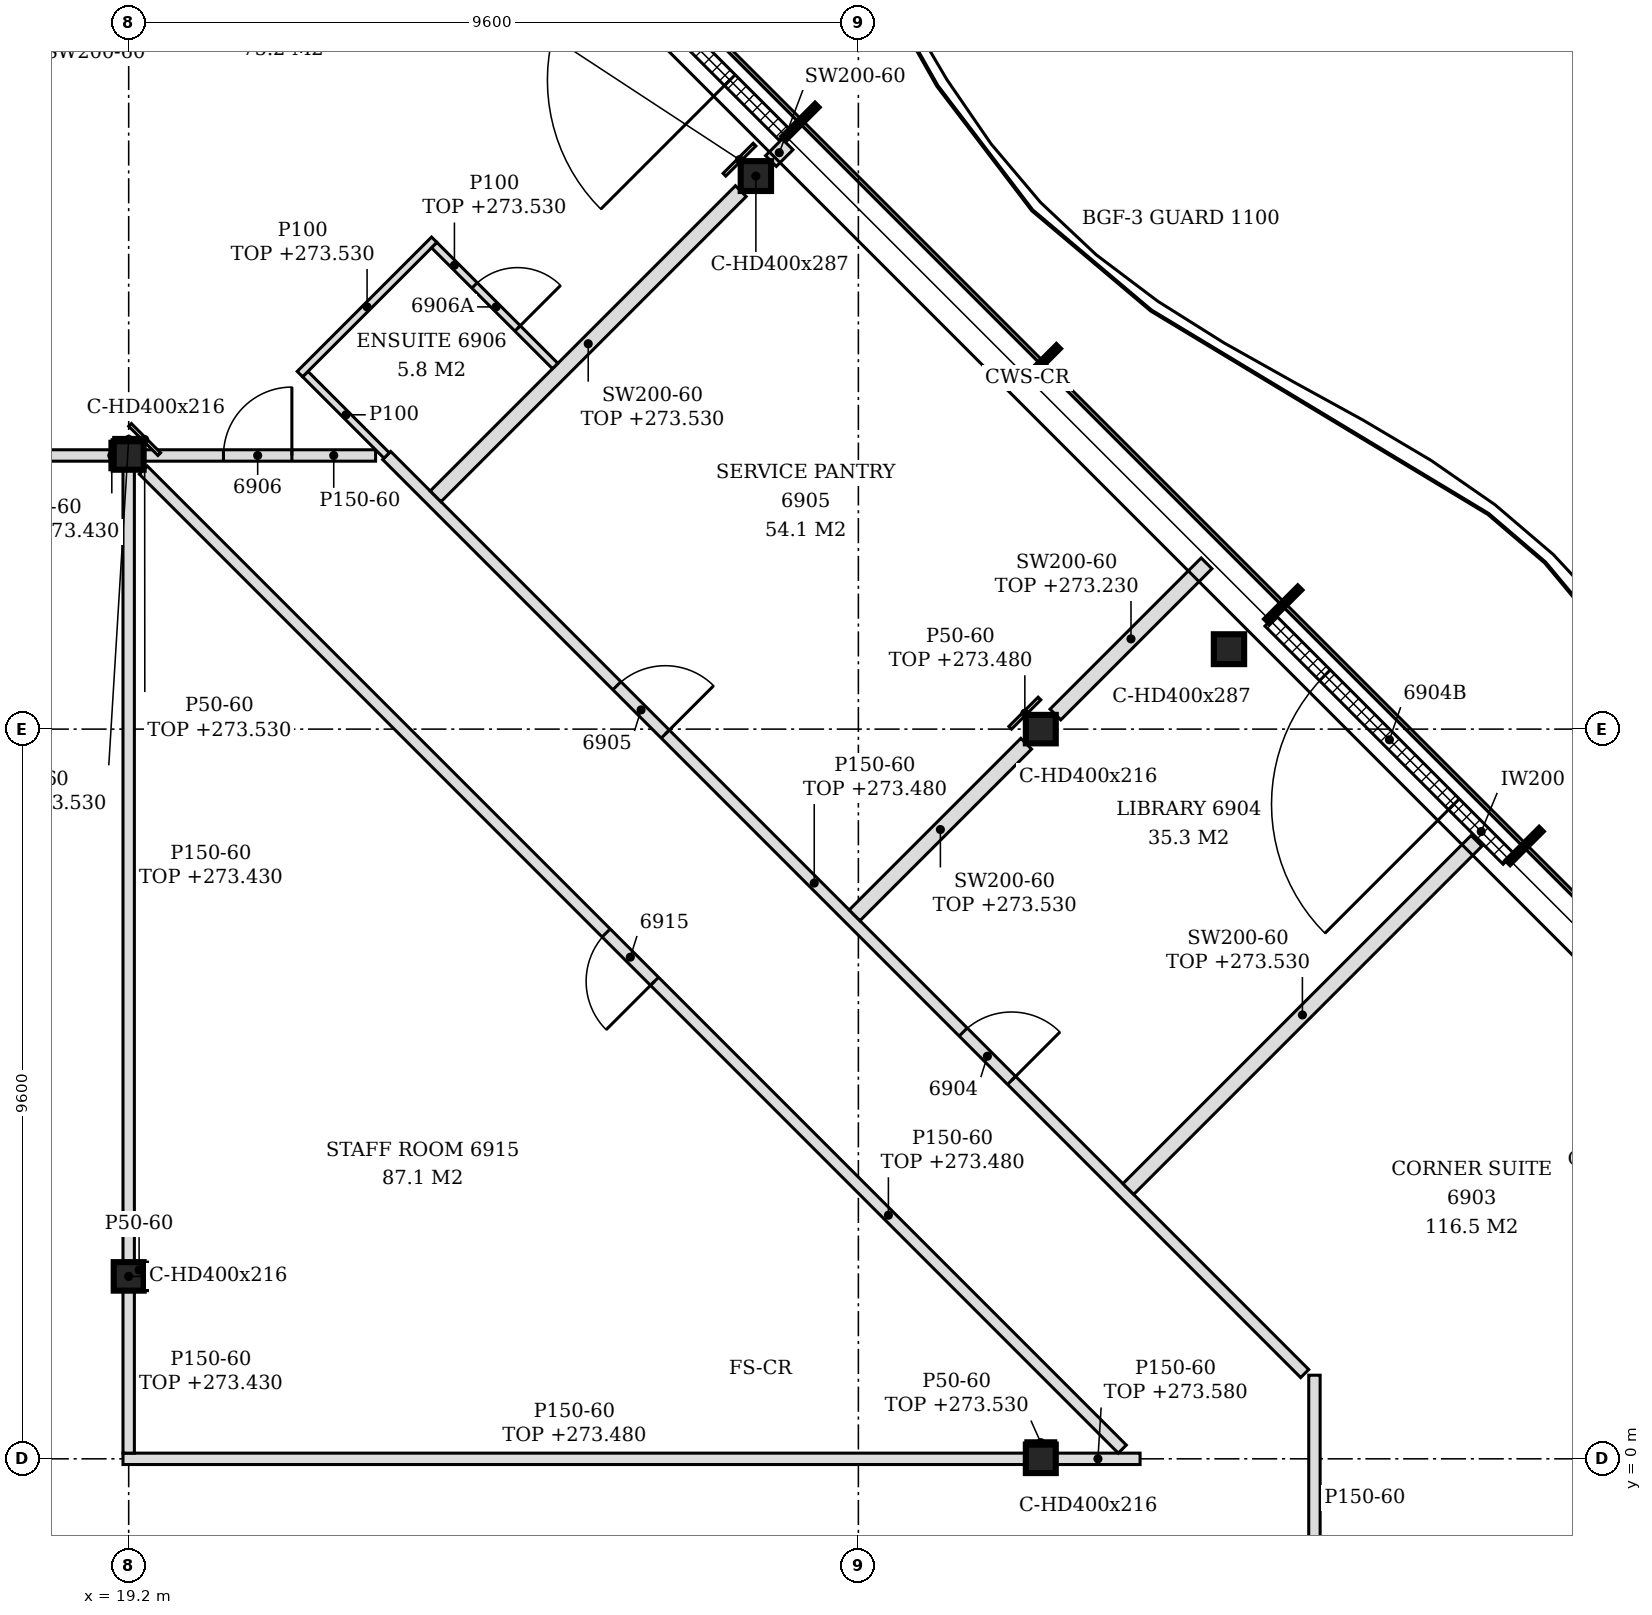
"""IFC4 building model, lengths in metres.
Left out: names, types, materials, properties, quantities, classifications, styles, units other than length and angle.
Written with IfcOpenShell. Run it as: python <this file> out.ifc"""

import sys

from ifc_helpers import new_model, si_unit, direction, frame, frame_2d, origin, origin_2d, place, context, subcontext, project, spatial, polyline, rectangle, i_section, outline, extrude, element, fill, save


model = new_model("IFC4")
c1 = context("Model", 3, precision=1e-05, world=origin(), true_north=direction((0.0, 1.0)))
c2 = subcontext(c1, "Body", "Model", "MODEL_VIEW")
j1 = project(units=[si_unit("LENGTHUNIT", "METRE"), si_unit("PLANEANGLEUNIT", "RADIAN")], contexts=[c1])
p1 = place(None, origin())
s1 = spatial("IfcSite", under=j1, at=p1, CompositionType="ELEMENT")
p2 = place(p1, origin())
s2 = spatial("IfcBuilding", under=s1, at=p2, CompositionType="ELEMENT")
p3 = place(p2, frame((0.0, 0.0, 270.6)))
s3 = spatial("IfcBuildingStorey", under=s2, at=p3, CompositionType="ELEMENT", Elevation=270.6)
for number, where, z_axis, x_axis in (
    (1, (33.676, 10.652, -0.15), (0.0, 0.0, 1.0), (1.0, 0.0, 0.0)),
    (2, (27.451, 16.876, -0.15), (0.0, 0.0, 1.0), (1.0, 0.0, 0.0)),
):
    element("IfcColumn", number, at=place(p3, frame(where, z_axis=z_axis, x_axis=x_axis)), inside=s3, PredefinedType="COLUMN", context=c2, shape_type="SweptSolid", body=[
        extrude(i_section(OverallWidth=0.399, OverallDepth=0.393, WebThickness=0.023, FlangeThickness=0.037, FilletRadius=0.015, at=origin_2d()), origin(), (0.0, 0.0, 1.0), 3.6),
    ])
for number, where, z_axis, x_axis in (
    (3, (19.2, 2.4, -0.15), (0.0, 0.0, 1.0), (1.0, 0.0, 0.0)),
    (4, (19.2, 13.2, -0.15), (0.0, 0.0, 1.0), (1.0, 0.0, 0.0)),
    (5, (31.2, 0.0, -0.15), (0.0, 0.0, 1.0), (1.0, 0.0, 0.0)),
    (6, (31.2, 9.6, -0.15), (0.0, 0.0, 1.0), (1.0, 0.0, 0.0)),
):
    element("IfcColumn", number, at=place(p3, frame(where, z_axis=z_axis, x_axis=x_axis)), inside=s3, PredefinedType="COLUMN", context=c2, shape_type="SweptSolid", body=[
        extrude(i_section(OverallWidth=0.394, OverallDepth=0.375, WebThickness=0.017, FlangeThickness=0.028, FilletRadius=0.015, at=origin_2d()), origin(), (0.0, 0.0, 1.0), 3.6),
    ])
p4 = place(p3, frame((37.353, 7.893, 0.0), z_axis=(0.0, 0.0, 1.0), x_axis=(-0.707134329907, 0.707079231393, 0.0)))
e7 = element("IfcWall", 7, at=p4, inside=s3, PredefinedType="NOTDEFINED", context=c2, shape_type="SweptSolid", body=[
    extrude(rectangle(XDim=4.431, YDim=0.2, at=frame_2d((2.215, 0.0))), origin(), (0.0, 0.0, 1.0), 3.45),
])
p5 = place(p4, frame((1.016, 0.0, 0.0)))
e8 = element("IfcOpeningElement", 8, at=p5, cuts=e7, PredefinedType="OPENING", context=c2, shape_type="SweptSolid", body=[
    extrude(rectangle(XDim=2.4, YDim=2.4, at=frame_2d((1.2, 1.2))), frame((0.0, 0.11, 0.0), z_axis=(0.0, -1.0, 0.0), x_axis=(1.0, 0.0, 0.0)), (0.0, 0.0, 1.0), 0.22),
])
p6 = place(p3, frame((27.826, 17.42, 0.0), z_axis=(0.0, 0.0, 1.0), x_axis=(-0.707079231393, 0.707134329907, 0.0)))
e9 = element("IfcWall", 9, at=p6, inside=s3, PredefinedType="NOTDEFINED", context=c2, shape_type="SweptSolid", body=[
    extrude(rectangle(XDim=4.431, YDim=0.2, at=frame_2d((2.215, 0.0))), origin(), (0.0, 0.0, 1.0), 3.45),
])
p7 = place(p6, frame((1.015, 0.0, 0.0)))
e10 = element("IfcOpeningElement", 10, at=p7, cuts=e9, PredefinedType="OPENING", context=c2, shape_type="SweptSolid", body=[
    extrude(rectangle(XDim=2.4, YDim=2.4, at=frame_2d((1.2, 1.2))), frame((0.0, 0.11, 0.0), z_axis=(0.0, -1.0, 0.0), x_axis=(1.0, 0.0, 0.0)), (0.0, 0.0, 1.0), 0.22),
])
p8 = place(p3, frame((34.8, -2.134, 0.0), z_axis=(0.0, 0.0, 1.0), x_axis=(0.0, 1.0, 0.0)))
e11 = element("IfcWall", 11, at=p8, inside=s3, PredefinedType="PARTITIONING", context=c2, shape_type="SweptSolid", body=[
    extrude(outline(polyline([(0.0, 0.0), (3.234, 0.0), (3.234, 3.45), (2.229, 3.45), (2.227, 2.98), (2.039, 2.98), (2.037, 3.45), (0.0, 3.45), (0.0, 0.0)])), frame((0.0, 0.075, 0.0), z_axis=(0.0, -1.0, 0.0), x_axis=(1.0, 0.0, 0.0)), (0.0, 0.0, 1.0), 0.15),
])
p9 = place(p3, frame((19.125, 0.0, 0.0), z_axis=(0.0, 0.0, 1.0), x_axis=(1.0, 0.0, 0.0)))
e12 = element("IfcWall", 12, at=p9, inside=s3, PredefinedType="PARTITIONING", context=c2, shape_type="SweptSolid", body=[
    extrude(outline(polyline([(0.0, 0.0), (11.878, 0.0), (11.878, 2.88), (0.225, 2.88), (0.223, 2.83), (0.0, 2.83), (0.0, 0.0)])), frame((0.0, 0.075, 0.0), z_axis=(0.0, -1.0, 0.0), x_axis=(1.0, 0.0, 0.0)), (0.0, 0.0, 1.0), 0.15),
])
p10 = place(p3, frame((31.397, 0.0, 0.0), z_axis=(0.0, 0.0, 1.0), x_axis=(1.0, 0.0, 0.0)))
e13 = element("IfcWall", 13, at=p10, inside=s3, PredefinedType="PARTITIONING", context=c2, shape_type="SweptSolid", body=[
    extrude(rectangle(XDim=1.109, YDim=0.15, at=frame_2d((0.555, 0.0))), origin(), (0.0, 0.0, 1.0), 2.98),
])
p11 = place(p3, frame((19.2, 0.075, 0.0), z_axis=(0.0, 0.0, 1.0), x_axis=(0.0, 1.0, 0.0)))
e14 = element("IfcWall", 14, at=p11, inside=s3, PredefinedType="PARTITIONING", context=c2, shape_type="SweptSolid", body=[
    extrude(rectangle(XDim=2.137, YDim=0.15, at=frame_2d((1.069, 0.0))), origin(), (0.0, 0.0, 1.0), 2.83),
])
p12 = place(p3, frame((32.272, 0.128, 0.0), z_axis=(0.0, 0.0, 1.0), x_axis=(-0.707106781187, 0.707106781187, 0.0)))
e15 = element("IfcWall", 15, at=p12, inside=s3, PredefinedType="PARTITIONING", context=c2, shape_type="SweptSolid", body=[
    extrude(rectangle(XDim=18.215, YDim=0.15, at=frame_2d((9.107, 0.0))), origin(), (0.0, 0.0, 1.0), 2.88),
])
p13 = place(p12, frame((8.703, 0.0, 0.0)))
e16 = element("IfcOpeningElement", 16, at=p13, cuts=e15, PredefinedType="OPENING", context=c2, shape_type="SweptSolid", body=[
    extrude(rectangle(XDim=0.9, YDim=2.1, at=frame_2d((0.45, 1.05))), frame((0.0, 0.085, 0.0), z_axis=(0.0, -1.0, 0.0), x_axis=(1.0, 0.0, 0.0)), (0.0, 0.0, 1.0), 0.17),
])
p14 = place(p3, frame((34.672, 1.122, 0.0), z_axis=(0.0, 0.0, 1.0), x_axis=(-0.707113927758, 0.707099634543, 0.0)))
e17 = element("IfcWall", 17, at=p14, inside=s3, PredefinedType="PARTITIONING", context=c2, shape_type="SweptSolid", body=[
    extrude(rectangle(XDim=17.081, YDim=0.15, at=frame_2d((8.541, 0.0))), origin(), (0.0, 0.0, 1.0), 2.88),
])
p15 = place(p14, frame((5.454, 0.0, 0.0)))
e18 = element("IfcOpeningElement", 18, at=p15, cuts=e17, PredefinedType="OPENING", context=c2, shape_type="SweptSolid", body=[
    extrude(rectangle(XDim=0.9, YDim=2.1, at=frame_2d((0.45, 1.05))), frame((0.0, 0.085, 0.0), z_axis=(0.0, -1.0, 0.0), x_axis=(1.0, 0.0, 0.0)), (0.0, 0.0, 1.0), 0.17),
])
p16 = place(p14, frame((11.897, 0.0, 0.0)))
e19 = element("IfcOpeningElement", 19, at=p16, cuts=e17, PredefinedType="OPENING", context=c2, shape_type="SweptSolid", body=[
    extrude(rectangle(XDim=0.9, YDim=2.1, at=frame_2d((0.45, 1.05))), frame((0.0, 0.085, 0.0), z_axis=(0.0, -1.0, 0.0), x_axis=(1.0, 0.0, 0.0)), (0.0, 0.0, 1.0), 0.17),
])
p17 = place(p3, frame((19.2, 2.587, 0.0), z_axis=(0.0, 0.0, 1.0), x_axis=(0.0, 1.0, 0.0)))
e20 = element("IfcWall", 20, at=p17, inside=s3, PredefinedType="PARTITIONING", context=c2, shape_type="SweptSolid", body=[
    extrude(rectangle(XDim=10.425, YDim=0.15, at=frame_2d((5.212, 0.0))), origin(), (0.0, 0.0, 1.0), 2.83),
])
p18 = place(p3, frame((32.351, 3.549, 0.0), z_axis=(0.0, 0.0, 1.0), x_axis=(0.707106781187, 0.707106781187, 0.0)))
e21 = element("IfcWall", 21, at=p18, inside=s3, PredefinedType="PARTITIONING", context=c2, shape_type="SweptSolid", body=[
    extrude(rectangle(XDim=6.479, YDim=0.2, at=frame_2d((3.24, 0.0))), origin(), (0.0, 0.0, 1.0), 2.93),
])
p19 = place(p3, frame((28.75, 7.15, 0.0), z_axis=(0.0, 0.0, 1.0), x_axis=(0.707106781187, 0.707106781187, 0.0)))
e22 = element("IfcWall", 22, at=p19, inside=s3, PredefinedType="PARTITIONING", context=c2, shape_type="SweptSolid", body=[
    extrude(rectangle(XDim=3.193, YDim=0.2, at=frame_2d((1.597, 0.0))), origin(), (0.0, 0.0, 1.0), 2.93),
])
p20 = place(p3, frame((31.392, 9.792, 0.0), z_axis=(0.0, 0.0, 1.0), x_axis=(0.707106781187, 0.707106781187, 0.0)))
e23 = element("IfcWall", 23, at=p20, inside=s3, PredefinedType="PARTITIONING", context=c2, shape_type="SweptSolid", body=[
    extrude(rectangle(XDim=2.812, YDim=0.2, at=frame_2d((1.406, 0.0))), origin(), (0.0, 0.0, 1.0), 2.63),
])
p21 = place(p3, frame((23.238, 12.662, 0.0), z_axis=(0.0, 0.0, 1.0), x_axis=(0.707128276734, 0.707085284986, 0.0)))
e24 = element("IfcWall", 24, at=p21, inside=s3, PredefinedType="PARTITIONING", context=c2, shape_type="SweptSolid", body=[
    extrude(rectangle(XDim=5.679, YDim=0.2, at=frame_2d((2.839, 0.0))), origin(), (0.0, 0.0, 1.0), 2.93),
])
p22 = place(p3, frame((7.397, 13.2, 0.0), z_axis=(0.0, 0.0, 1.0), x_axis=(1.0, 0.0, 0.0)))
e25 = element("IfcWall", 25, at=p22, inside=s3, PredefinedType="PARTITIONING", context=c2, shape_type="SweptSolid", body=[
    extrude(rectangle(XDim=11.606, YDim=0.15, at=frame_2d((5.803, 0.0))), origin(), (0.0, 0.0, 1.0), 2.83),
])
p23 = place(p22, frame((8.26, 0.0, 0.0)))
e26 = element("IfcOpeningElement", 26, at=p23, cuts=e25, PredefinedType="OPENING", context=c2, shape_type="SweptSolid", body=[
    extrude(rectangle(XDim=0.9, YDim=2.1, at=frame_2d((0.45, 1.05))), frame((0.0, 0.085, 0.0), z_axis=(0.0, -1.0, 0.0), x_axis=(1.0, 0.0, 0.0)), (0.0, 0.0, 1.0), 0.17),
])
p24 = place(p3, frame((19.397, 13.2, 0.0), z_axis=(0.0, 0.0, 1.0), x_axis=(1.0, 0.0, 0.0)))
e27 = element("IfcWall", 27, at=p24, inside=s3, PredefinedType="PARTITIONING", context=c2, shape_type="SweptSolid", body=[
    extrude(rectangle(XDim=3.051, YDim=0.15, at=frame_2d((1.526, 0.0))), origin(), (0.0, 0.0, 1.0), 3.45),
])
p25 = place(p24, frame((1.05, 0.0, 0.0)))
e28 = element("IfcOpeningElement", 28, at=p25, cuts=e27, PredefinedType="OPENING", context=c2, shape_type="SweptSolid", body=[
    extrude(rectangle(XDim=0.9, YDim=2.1, at=frame_2d((0.45, 1.05))), frame((0.0, 0.085, 0.0), z_axis=(0.0, -1.0, 0.0), x_axis=(1.0, 0.0, 0.0)), (0.0, 0.0, 1.0), 0.17),
])
p26 = place(p3, frame((22.594, 13.2, 0.0), z_axis=(0.0, 0.0, 1.0), x_axis=(-0.707106781187, 0.707106781187, 0.0)))
e29 = element("IfcWall", 29, at=p26, inside=s3, PredefinedType="PARTITIONING", context=c2, shape_type="SweptSolid", body=[
    extrude(rectangle(XDim=1.514, YDim=0.1, at=frame_2d((0.757, 0.0))), origin(), (0.0, 0.0, 1.0), 3.45),
])
p27 = place(p3, frame((21.453, 14.271, 0.0), z_axis=(0.0, 0.0, 1.0), x_axis=(0.707057949532, 0.707155609469, 0.0)))
e30 = element("IfcWall", 30, at=p27, inside=s3, PredefinedType="PARTITIONING", context=c2, shape_type="SweptSolid", body=[
    extrude(rectangle(XDim=2.5, YDim=0.1, at=frame_2d((1.25, 0.0))), origin(), (0.0, 0.0, 1.0), 2.93),
])
p28 = place(p3, frame((24.811, 14.377, 0.0), z_axis=(0.0, 0.0, 1.0), x_axis=(-0.707106781187, 0.707106781187, 0.0)))
e31 = element("IfcWall", 31, at=p28, inside=s3, PredefinedType="PARTITIONING", context=c2, shape_type="SweptSolid", body=[
    extrude(rectangle(XDim=2.25, YDim=0.1, at=frame_2d((1.125, 0.0))), origin(), (0.0, 0.0, 1.0), 2.93),
])
p29 = place(p28, frame((0.7, 0.0, 0.0)))
e32 = element("IfcOpeningElement", 32, at=p29, cuts=e31, PredefinedType="OPENING", context=c2, shape_type="SweptSolid", body=[
    extrude(rectangle(XDim=0.8, YDim=2.1, at=frame_2d((0.4, 1.05))), frame((0.0, 0.06, 0.0), z_axis=(0.0, -1.0, 0.0), x_axis=(1.0, 0.0, 0.0)), (0.0, 0.0, 1.0), 0.12),
])
p30 = place(p3, frame((27.65, 17.073, 0.0), z_axis=(0.0, 0.0, 1.0), x_axis=(0.707106781187, 0.707106781187, 0.0)))
e33 = element("IfcWall", 33, at=p30, inside=s3, PredefinedType="PARTITIONING", context=c2, shape_type="SweptSolid", body=[
    extrude(rectangle(XDim=0.31, YDim=0.2, at=frame_2d((0.155, 0.0))), origin(), (0.0, 0.0, 1.0), 3.45),
])
p31 = place(p3, frame((31.003, 0.212, 0.0), z_axis=(0.0, 0.0, 1.0), x_axis=(1.0, 0.0, 0.0)))
e34 = element("IfcWall", 34, at=p31, inside=s3, PredefinedType="PARTITIONING", context=c2, shape_type="SweptSolid", body=[
    extrude(rectangle(XDim=0.394, YDim=0.05, at=frame_2d((0.197, 0.0))), origin(), (0.0, 0.0, 1.0), 2.93),
])
p32 = place(p3, frame((19.422, 2.212, 0.0), z_axis=(0.0, 0.0, 1.0), x_axis=(0.0, 1.0, 0.0)))
e35 = element("IfcWall", 35, at=p32, inside=s3, PredefinedType="PARTITIONING", context=c2, shape_type="SweptSolid", body=[
    extrude(rectangle(XDim=0.375, YDim=0.05, at=frame_2d((0.188, 0.0))), origin(), (0.0, 0.0, 1.0), 3.45),
])
p33 = place(p3, frame((18.978, 13.012, 0.0), z_axis=(0.0, 0.0, 1.0), x_axis=(0.0, 1.0, 0.0)))
e36 = element("IfcWall", 36, at=p33, inside=s3, PredefinedType="PARTITIONING", context=c2, shape_type="SweptSolid", body=[
    extrude(rectangle(XDim=0.375, YDim=0.05, at=frame_2d((0.188, 0.0))), origin(), (0.0, 0.0, 1.0), 2.83),
])
p34 = place(p3, frame((19.602, 13.218, 0.0), z_axis=(0.0, 0.0, 1.0), x_axis=(-0.707106781187, 0.707106781187, 0.0)))
e37 = element("IfcWall", 37, at=p34, inside=s3, PredefinedType="PARTITIONING", context=c2, shape_type="SweptSolid", body=[
    extrude(rectangle(XDim=0.544, YDim=0.05, at=frame_2d((0.272, 0.0))), origin(), (0.0, 0.0, 1.0), 2.93),
])
p35 = place(p3, frame((30.798, 9.618, 0.0), z_axis=(0.0, 0.0, 1.0), x_axis=(0.707106781187, 0.707106781187, 0.0)))
e38 = element("IfcWall", 38, at=p35, inside=s3, PredefinedType="PARTITIONING", context=c2, shape_type="SweptSolid", body=[
    extrude(rectangle(XDim=0.544, YDim=0.05, at=frame_2d((0.272, 0.0))), origin(), (0.0, 0.0, 1.0), 2.88),
])
p36 = place(p3, frame((27.038, 16.893, 0.0), z_axis=(0.0, 0.0, 1.0), x_axis=(0.707106781187, 0.707106781187, 0.0)))
e39 = element("IfcWall", 39, at=p36, inside=s3, PredefinedType="PARTITIONING", context=c2, shape_type="SweptSolid", body=[
    extrude(rectangle(XDim=0.56, YDim=0.05, at=frame_2d((0.28, 0.0))), origin(), (0.0, 0.0, 1.0), 2.93),
])
p37 = place(p3, frame((19.003, 13.413, 0.0), z_axis=(0.0, 0.0, 1.0), x_axis=(1.0, 0.0, 0.0)))
e40 = element("IfcWall", 40, at=p37, inside=s3, PredefinedType="PARTITIONING", context=c2, shape_type="SweptSolid", body=[
    extrude(rectangle(XDim=0.394, YDim=0.05, at=frame_2d((0.197, 0.0))), origin(), (0.0, 0.0, 1.0), 2.93),
])
p38 = place(p5, origin())
e41 = element("IfcDoor", 41, at=p38, inside=s3, OperationType="SINGLE_SWING_LEFT", PredefinedType="DOOR", context=c2, shape_type="SweptSolid", body=[
    extrude(rectangle(XDim=2.4, YDim=2.4, at=frame_2d((1.2, 1.2))), frame((0.0, 0.025, 0.0), z_axis=(0.0, -1.0, 0.0), x_axis=(1.0, 0.0, 0.0)), (0.0, 0.0, 1.0), 0.05),
])
fill(e8, e41)
p39 = place(p7, origin())
e42 = element("IfcDoor", 42, at=p39, inside=s3, OperationType="SINGLE_SWING_LEFT", PredefinedType="DOOR", context=c2, shape_type="SweptSolid", body=[
    extrude(rectangle(XDim=2.4, YDim=2.4, at=frame_2d((1.2, 1.2))), frame((0.0, 0.025, 0.0), z_axis=(0.0, -1.0, 0.0), x_axis=(1.0, 0.0, 0.0)), (0.0, 0.0, 1.0), 0.05),
])
fill(e10, e42)
p40 = place(p15, frame((0.9, 0.0, 0.0), z_axis=(0.0, 0.0, 1.0), x_axis=(-1.0, 0.0, 0.0)))
e43 = element("IfcDoor", 43, at=p40, inside=s3, OperationType="SINGLE_SWING_RIGHT", PredefinedType="DOOR", context=c2, shape_type="SweptSolid", body=[
    extrude(rectangle(XDim=0.9, YDim=2.1, at=frame_2d((0.45, 1.05))), frame((0.0, 0.025, 0.0), z_axis=(0.0, -1.0, 0.0), x_axis=(1.0, 0.0, 0.0)), (0.0, 0.0, 1.0), 0.05),
])
fill(e18, e43)
p41 = place(p16, frame((0.9, 0.0, 0.0), z_axis=(0.0, 0.0, 1.0), x_axis=(-1.0, 0.0, 0.0)))
e44 = element("IfcDoor", 44, at=p41, inside=s3, OperationType="SINGLE_SWING_RIGHT", PredefinedType="DOOR", context=c2, shape_type="SweptSolid", body=[
    extrude(rectangle(XDim=0.9, YDim=2.1, at=frame_2d((0.45, 1.05))), frame((0.0, 0.025, 0.0), z_axis=(0.0, -1.0, 0.0), x_axis=(1.0, 0.0, 0.0)), (0.0, 0.0, 1.0), 0.05),
])
fill(e19, e44)
p42 = place(p25, origin())
e45 = element("IfcDoor", 45, at=p42, inside=s3, OperationType="SINGLE_SWING_RIGHT", PredefinedType="DOOR", context=c2, shape_type="SweptSolid", body=[
    extrude(rectangle(XDim=0.9, YDim=2.1, at=frame_2d((0.45, 1.05))), frame((0.0, 0.025, 0.0), z_axis=(0.0, -1.0, 0.0), x_axis=(1.0, 0.0, 0.0)), (0.0, 0.0, 1.0), 0.05),
])
fill(e28, e45)
p43 = place(p29, frame((0.8, 0.0, 0.0), z_axis=(0.0, 0.0, 1.0), x_axis=(-1.0, 0.0, 0.0)))
e46 = element("IfcDoor", 46, at=p43, inside=s3, OperationType="SINGLE_SWING_RIGHT", PredefinedType="DOOR", context=c2, shape_type="SweptSolid", body=[
    extrude(rectangle(XDim=0.8, YDim=2.1, at=frame_2d((0.4, 1.05))), frame((0.0, 0.025, 0.0), z_axis=(0.0, -1.0, 0.0), x_axis=(1.0, 0.0, 0.0)), (0.0, 0.0, 1.0), 0.05),
])
fill(e32, e46)
p44 = place(p13, origin())
e47 = element("IfcDoor", 47, at=p44, inside=s3, OperationType="SINGLE_SWING_LEFT", PredefinedType="DOOR", context=c2, shape_type="SweptSolid", body=[
    extrude(rectangle(XDim=0.9, YDim=2.1, at=frame_2d((0.45, 1.05))), frame((0.0, 0.025, 0.0), z_axis=(0.0, -1.0, 0.0), x_axis=(1.0, 0.0, 0.0)), (0.0, 0.0, 1.0), 0.05),
])
fill(e16, e47)
save(model, sys.argv[1])
